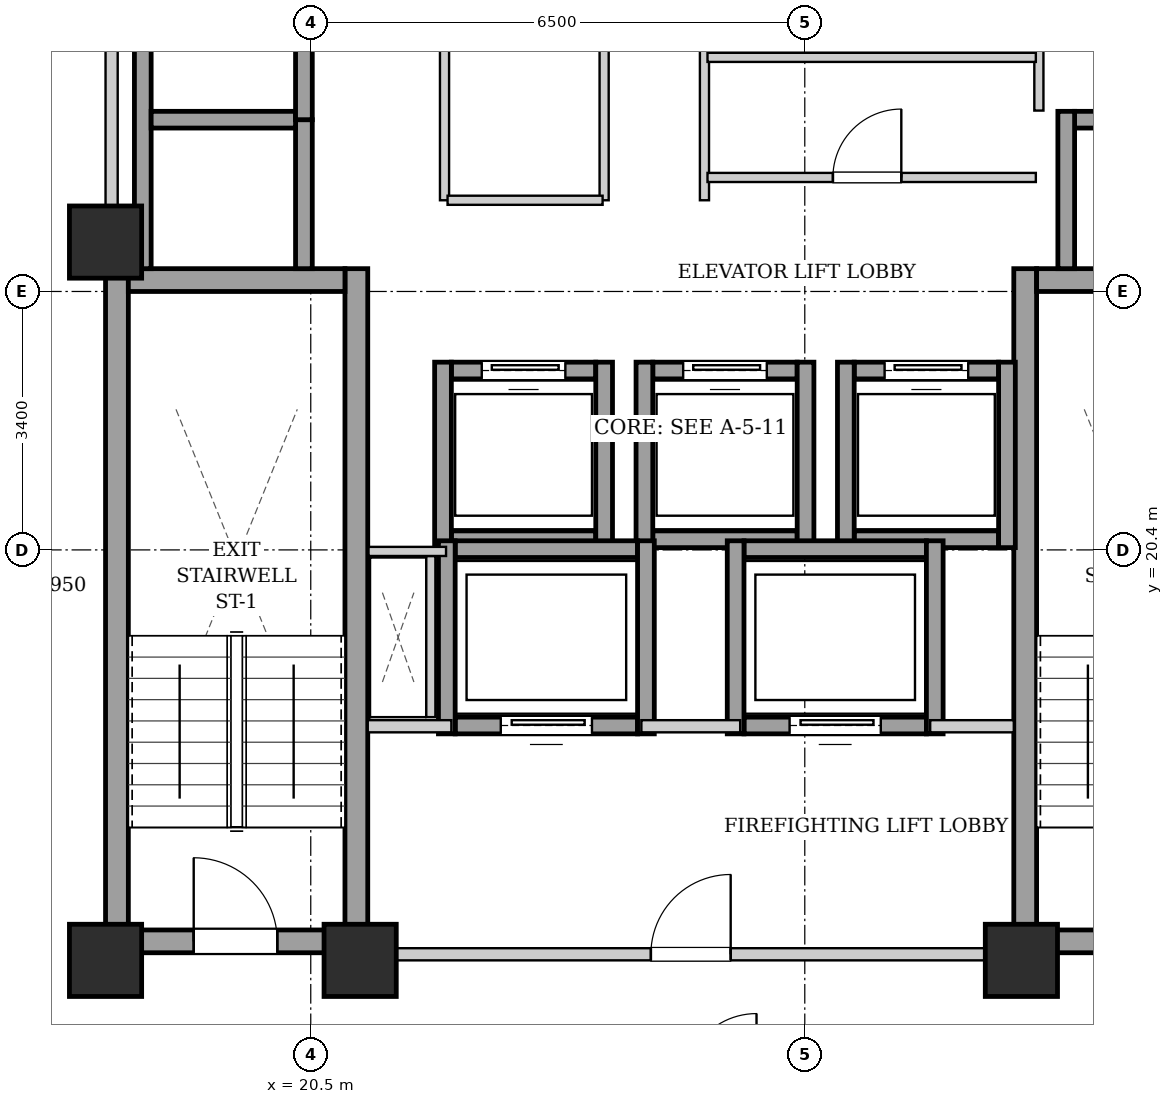
"""IFC4 building model, lengths in metres.
Left out: names, types, materials, properties, quantities, classifications, styles, units other than length and angle.
Written with IfcOpenShell. Run it as: python <this file> out.ifc"""

import sys

from ifc_helpers import new_model, si_unit, direction, frame, frame_2d, origin, origin_2d, place, context, subcontext, project, spatial, rectangle, extrude, element, fill, save


model = new_model("IFC4")
c1 = context("Model", 3, precision=1e-05, world=origin(), true_north=direction((0.0, 1.0)))
c2 = subcontext(c1, "Body", "Model", "MODEL_VIEW")
j1 = project(units=[si_unit("LENGTHUNIT", "METRE"), si_unit("PLANEANGLEUNIT", "RADIAN")], contexts=[c1])
p1 = place(None, origin())
s1 = spatial("IfcSite", under=j1, at=p1, CompositionType="ELEMENT")
p2 = place(p1, origin())
s2 = spatial("IfcBuilding", under=s1, at=p2, CompositionType="ELEMENT")
p3 = place(p2, frame((0.0, 0.0, 134.15)))
s3 = spatial("IfcBuildingStorey", under=s2, at=p3, CompositionType="ELEMENT", Elevation=134.15)
for number, where, z_axis, x_axis in (
    (1, (17.8, 15.0, 0.0), (0.0, 0.0, 1.0), (1.0, 0.0, 0.0)),
    (2, (21.15, 15.0, 0.0), (0.0, 0.0, 1.0), (1.0, 0.0, 0.0)),
    (3, (29.85, 15.0, 0.0), (0.0, 0.0, 1.0), (1.0, 0.0, 0.0)),
    (4, (17.8, 24.45, 0.0), (0.0, 0.0, 1.0), (1.0, 0.0, 0.0)),
):
    element("IfcColumn", number, at=place(p3, frame(where, z_axis=z_axis, x_axis=x_axis)), inside=s3, PredefinedType="COLUMN", context=c2, shape_type="SweptSolid", body=[
        extrude(rectangle(XDim=0.95, YDim=0.95, at=origin_2d()), origin(), (0.0, 0.0, 1.0), 3.25),
    ])
for number, where, z_axis, x_axis in (
    (5, (17.95, 15.1, 0.0), (0.0, 0.0, 1.0), (0.0, 1.0, 0.0)),
    (6, (21.1, 15.1, 0.0), (0.0, 0.0, 1.0), (0.0, 1.0, 0.0)),
):
    element("IfcWall", number, at=place(p3, frame(where, z_axis=z_axis, x_axis=x_axis)), inside=s3, PredefinedType="SHEAR", context=c2, shape_type="SweptSolid", body=[
        extrude(rectangle(XDim=9.0, YDim=0.3, at=frame_2d((4.5, 0.0))), origin(), (0.0, 0.0, 1.0), 2.99),
    ])
p4 = place(p3, frame((18.1, 23.95, 0.0), z_axis=(0.0, 0.0, 1.0), x_axis=(1.0, 0.0, 0.0)))
e7 = element("IfcWall", 7, at=p4, inside=s3, PredefinedType="SHEAR", context=c2, shape_type="SweptSolid", body=[
    extrude(rectangle(XDim=2.85, YDim=0.3, at=frame_2d((1.425, 0.0))), origin(), (0.0, 0.0, 1.0), 2.99),
])
p5 = place(p3, frame((18.1, 15.25, 0.0), z_axis=(0.0, 0.0, 1.0), x_axis=(1.0, 0.0, 0.0)))
e8 = element("IfcWall", 8, at=p5, inside=s3, PredefinedType="SHEAR", context=c2, shape_type="SweptSolid", body=[
    extrude(rectangle(XDim=2.85, YDim=0.3, at=frame_2d((1.425, 0.0))), origin(), (0.0, 0.0, 1.0), 2.99),
])
p6 = place(p5, frame((0.86, 0.0, 0.0)))
e9 = element("IfcOpeningElement", 9, at=p6, cuts=e8, PredefinedType="OPENING", context=c2, shape_type="SweptSolid", body=[
    extrude(rectangle(XDim=1.1, YDim=2.05, at=frame_2d((0.55, 1.025))), frame((0.0, 0.16, 0.0), z_axis=(0.0, -1.0, 0.0), x_axis=(1.0, 0.0, 0.0)), (0.0, 0.0, 1.0), 0.32),
])
p7 = place(p3, frame((29.9, 15.1, 0.0), z_axis=(0.0, 0.0, 1.0), x_axis=(0.0, 1.0, 0.0)))
e10 = element("IfcWall", 10, at=p7, inside=s3, PredefinedType="SHEAR", context=c2, shape_type="SweptSolid", body=[
    extrude(rectangle(XDim=9.0, YDim=0.3, at=frame_2d((4.5, 0.0))), origin(), (0.0, 0.0, 1.0), 2.99),
])
p8 = place(p3, frame((30.05, 23.95, 0.0), z_axis=(0.0, 0.0, 1.0), x_axis=(1.0, 0.0, 0.0)))
e11 = element("IfcWall", 11, at=p8, inside=s3, PredefinedType="SHEAR", context=c2, shape_type="SweptSolid", body=[
    extrude(rectangle(XDim=2.85, YDim=0.3, at=frame_2d((1.425, 0.0))), origin(), (0.0, 0.0, 1.0), 2.99),
])
p9 = place(p3, frame((30.05, 15.25, 0.0), z_axis=(0.0, 0.0, 1.0), x_axis=(1.0, 0.0, 0.0)))
e12 = element("IfcWall", 12, at=p9, inside=s3, PredefinedType="SHEAR", context=c2, shape_type="SweptSolid", body=[
    extrude(rectangle(XDim=2.85, YDim=0.3, at=frame_2d((1.425, 0.0))), origin(), (0.0, 0.0, 1.0), 2.99),
])
p10 = place(p9, frame((0.86, 0.0, 0.0)))
e13 = element("IfcOpeningElement", 13, at=p10, cuts=e12, PredefinedType="OPENING", context=c2, shape_type="SweptSolid", body=[
    extrude(rectangle(XDim=1.1, YDim=2.05, at=frame_2d((0.55, 1.025))), frame((0.0, 0.16, 0.0), z_axis=(0.0, -1.0, 0.0), x_axis=(1.0, 0.0, 0.0)), (0.0, 0.0, 1.0), 0.32),
])
p11 = place(p3, frame((22.35, 20.54, 0.0), z_axis=(0.0, 0.0, 1.0), x_axis=(1.0, 0.0, 0.0)))
e14 = element("IfcWall", 14, at=p11, inside=s3, PredefinedType="SHEAR", context=c2, shape_type="SweptSolid", body=[
    extrude(rectangle(XDim=1.9, YDim=0.22, at=frame_2d((0.95, 0.0))), origin(), (0.0, 0.0, 1.0), 2.99),
])
p12 = place(p3, frame((22.35, 22.76, 0.0), z_axis=(0.0, 0.0, 1.0), x_axis=(1.0, 0.0, 0.0)))
e15 = element("IfcWall", 15, at=p12, inside=s3, PredefinedType="SHEAR", context=c2, shape_type="SweptSolid", body=[
    extrude(rectangle(XDim=1.9, YDim=0.22, at=frame_2d((0.95, 0.0))), origin(), (0.0, 0.0, 1.0), 2.99),
])
p13 = place(p12, frame((0.4, 0.0, 0.0)))
e16 = element("IfcOpeningElement", 16, at=p13, cuts=e15, PredefinedType="OPENING", context=c2, shape_type="SweptSolid", body=[
    extrude(rectangle(XDim=1.1, YDim=2.15, at=frame_2d((0.55, 1.075))), frame((0.0, 0.12, 0.0), z_axis=(0.0, -1.0, 0.0), x_axis=(1.0, 0.0, 0.0)), (0.0, 0.0, 1.0), 0.24),
])
for number, where, z_axis, x_axis in (
    (17, (22.24, 20.43, 0.0), (0.0, 0.0, 1.0), (0.0, 1.0, 0.0)),
    (18, (24.36, 20.43, 0.0), (0.0, 0.0, 1.0), (0.0, 1.0, 0.0)),
):
    element("IfcWall", number, at=place(p3, frame(where, z_axis=z_axis, x_axis=x_axis)), inside=s3, PredefinedType="SHEAR", context=c2, shape_type="SweptSolid", body=[
        extrude(rectangle(XDim=2.44, YDim=0.22, at=frame_2d((1.22, 0.0))), origin(), (0.0, 0.0, 1.0), 2.99),
    ])
p14 = place(p3, frame((25.0, 20.54, 0.0), z_axis=(0.0, 0.0, 1.0), x_axis=(1.0, 0.0, 0.0)))
e19 = element("IfcWall", 19, at=p14, inside=s3, PredefinedType="SHEAR", context=c2, shape_type="SweptSolid", body=[
    extrude(rectangle(XDim=1.9, YDim=0.22, at=frame_2d((0.95, 0.0))), origin(), (0.0, 0.0, 1.0), 2.99),
])
p15 = place(p3, frame((25.0, 22.76, 0.0), z_axis=(0.0, 0.0, 1.0), x_axis=(1.0, 0.0, 0.0)))
e20 = element("IfcWall", 20, at=p15, inside=s3, PredefinedType="SHEAR", context=c2, shape_type="SweptSolid", body=[
    extrude(rectangle(XDim=1.9, YDim=0.22, at=frame_2d((0.95, 0.0))), origin(), (0.0, 0.0, 1.0), 2.99),
])
p16 = place(p15, frame((0.4, 0.0, 0.0)))
e21 = element("IfcOpeningElement", 21, at=p16, cuts=e20, PredefinedType="OPENING", context=c2, shape_type="SweptSolid", body=[
    extrude(rectangle(XDim=1.1, YDim=2.15, at=frame_2d((0.55, 1.075))), frame((0.0, 0.12, 0.0), z_axis=(0.0, -1.0, 0.0), x_axis=(1.0, 0.0, 0.0)), (0.0, 0.0, 1.0), 0.24),
])
for number, where, z_axis, x_axis in (
    (22, (24.89, 20.43, 0.0), (0.0, 0.0, 1.0), (0.0, 1.0, 0.0)),
    (23, (27.01, 20.43, 0.0), (0.0, 0.0, 1.0), (0.0, 1.0, 0.0)),
):
    element("IfcWall", number, at=place(p3, frame(where, z_axis=z_axis, x_axis=x_axis)), inside=s3, PredefinedType="SHEAR", context=c2, shape_type="SweptSolid", body=[
        extrude(rectangle(XDim=2.44, YDim=0.22, at=frame_2d((1.22, 0.0))), origin(), (0.0, 0.0, 1.0), 2.99),
    ])
p17 = place(p3, frame((27.65, 20.54, 0.0), z_axis=(0.0, 0.0, 1.0), x_axis=(1.0, 0.0, 0.0)))
e24 = element("IfcWall", 24, at=p17, inside=s3, PredefinedType="SHEAR", context=c2, shape_type="SweptSolid", body=[
    extrude(rectangle(XDim=1.9, YDim=0.22, at=frame_2d((0.95, 0.0))), origin(), (0.0, 0.0, 1.0), 2.99),
])
p18 = place(p3, frame((27.65, 22.76, 0.0), z_axis=(0.0, 0.0, 1.0), x_axis=(1.0, 0.0, 0.0)))
e25 = element("IfcWall", 25, at=p18, inside=s3, PredefinedType="SHEAR", context=c2, shape_type="SweptSolid", body=[
    extrude(rectangle(XDim=1.9, YDim=0.22, at=frame_2d((0.95, 0.0))), origin(), (0.0, 0.0, 1.0), 2.99),
])
p19 = place(p18, frame((0.4, 0.0, 0.0)))
e26 = element("IfcOpeningElement", 26, at=p19, cuts=e25, PredefinedType="OPENING", context=c2, shape_type="SweptSolid", body=[
    extrude(rectangle(XDim=1.1, YDim=2.15, at=frame_2d((0.55, 1.075))), frame((0.0, 0.12, 0.0), z_axis=(0.0, -1.0, 0.0), x_axis=(1.0, 0.0, 0.0)), (0.0, 0.0, 1.0), 0.24),
])
for number, where, z_axis, x_axis in (
    (27, (27.54, 20.43, 0.0), (0.0, 0.0, 1.0), (0.0, 1.0, 0.0)),
    (28, (29.66, 20.43, 0.0), (0.0, 0.0, 1.0), (0.0, 1.0, 0.0)),
):
    element("IfcWall", number, at=place(p3, frame(where, z_axis=z_axis, x_axis=x_axis)), inside=s3, PredefinedType="SHEAR", context=c2, shape_type="SweptSolid", body=[
        extrude(rectangle(XDim=2.44, YDim=0.22, at=frame_2d((1.22, 0.0))), origin(), (0.0, 0.0, 1.0), 2.99),
    ])
p20 = place(p3, frame((18.29, 24.1, 0.0), z_axis=(0.0, 0.0, 1.0), x_axis=(0.0, 1.0, 0.0)))
e29 = element("IfcWall", 29, at=p20, inside=s3, PredefinedType="SHEAR", context=c2, shape_type="SweptSolid", body=[
    extrude(rectangle(XDim=4.14, YDim=0.22, at=frame_2d((2.07, 0.0))), origin(), (0.0, 0.0, 1.0), 2.99),
])
p21 = place(p3, frame((20.41, 24.1, 0.0), z_axis=(0.0, 0.0, 1.0), x_axis=(0.0, 1.0, 0.0)))
e30 = element("IfcWall", 30, at=p21, inside=s3, PredefinedType="SHEAR", context=c2, shape_type="SweptSolid", body=[
    extrude(rectangle(XDim=1.96, YDim=0.22, at=frame_2d((0.98, 0.0))), origin(), (0.0, 0.0, 1.0), 2.99),
])
p22 = place(p3, frame((18.4, 26.06, 0.0), z_axis=(0.0, 0.0, 1.0), x_axis=(1.0, 0.0, 0.0)))
e31 = element("IfcWall", 31, at=p22, inside=s3, PredefinedType="SHEAR", context=c2, shape_type="SweptSolid", body=[
    extrude(rectangle(XDim=1.9, YDim=0.22, at=frame_2d((0.95, 0.0))), origin(), (0.0, 0.0, 1.0), 2.99),
])
p23 = place(p3, frame((20.41, 26.06, 0.0), z_axis=(0.0, 0.0, 1.0), x_axis=(0.0, 1.0, 0.0)))
e32 = element("IfcWall", 32, at=p23, inside=s3, PredefinedType="SHEAR", context=c2, shape_type="SweptSolid", body=[
    extrude(rectangle(XDim=2.18, YDim=0.22, at=frame_2d((1.09, 0.0))), origin(), (0.0, 0.0, 1.0), 2.99),
])
p24 = place(p3, frame((30.55, 26.06, 0.0), z_axis=(0.0, 0.0, 1.0), x_axis=(1.0, 0.0, 0.0)))
e33 = element("IfcWall", 33, at=p24, inside=s3, PredefinedType="SHEAR", context=c2, shape_type="SweptSolid", body=[
    extrude(rectangle(XDim=1.9, YDim=0.22, at=frame_2d((0.95, 0.0))), origin(), (0.0, 0.0, 1.0), 2.99),
])
p25 = place(p3, frame((30.44, 24.1, 0.0), z_axis=(0.0, 0.0, 1.0), x_axis=(0.0, 1.0, 0.0)))
e34 = element("IfcWall", 34, at=p25, inside=s3, PredefinedType="SHEAR", context=c2, shape_type="SweptSolid", body=[
    extrude(rectangle(XDim=2.07, YDim=0.22, at=frame_2d((1.035, 0.0))), origin(), (0.0, 0.0, 1.0), 2.99),
])
p26 = place(p3, frame((22.4, 18.09, 0.0), z_axis=(0.0, 0.0, 1.0), x_axis=(1.0, 0.0, 0.0)))
e35 = element("IfcWall", 35, at=p26, inside=s3, PredefinedType="SHEAR", context=c2, shape_type="SweptSolid", body=[
    extrude(rectangle(XDim=2.4, YDim=0.22, at=frame_2d((1.2, 0.0))), origin(), (0.0, 0.0, 1.0), 2.99),
])
p27 = place(p26, frame((0.6, 0.0, 0.0)))
e36 = element("IfcOpeningElement", 36, at=p27, cuts=e35, PredefinedType="OPENING", context=c2, shape_type="SweptSolid", body=[
    extrude(rectangle(XDim=1.2, YDim=2.15, at=frame_2d((0.6, 1.075))), frame((0.0, 0.12, 0.0), z_axis=(0.0, -1.0, 0.0), x_axis=(1.0, 0.0, 0.0)), (0.0, 0.0, 1.0), 0.24),
])
p28 = place(p3, frame((22.4, 20.41, 0.0), z_axis=(0.0, 0.0, 1.0), x_axis=(1.0, 0.0, 0.0)))
e37 = element("IfcWall", 37, at=p28, inside=s3, PredefinedType="SHEAR", context=c2, shape_type="SweptSolid", body=[
    extrude(rectangle(XDim=2.4, YDim=0.22, at=frame_2d((1.2, 0.0))), origin(), (0.0, 0.0, 1.0), 2.99),
])
for number, where, z_axis, x_axis in (
    (38, (22.29, 17.98, 0.0), (0.0, 0.0, 1.0), (0.0, 1.0, 0.0)),
    (39, (24.91, 17.98, 0.0), (0.0, 0.0, 1.0), (0.0, 1.0, 0.0)),
):
    element("IfcWall", number, at=place(p3, frame(where, z_axis=z_axis, x_axis=x_axis)), inside=s3, PredefinedType="SHEAR", context=c2, shape_type="SweptSolid", body=[
        extrude(rectangle(XDim=2.54, YDim=0.22, at=frame_2d((1.27, 0.0))), origin(), (0.0, 0.0, 1.0), 2.99),
    ])
p29 = place(p3, frame((26.2, 18.09, 0.0), z_axis=(0.0, 0.0, 1.0), x_axis=(1.0, 0.0, 0.0)))
e40 = element("IfcWall", 40, at=p29, inside=s3, PredefinedType="SHEAR", context=c2, shape_type="SweptSolid", body=[
    extrude(rectangle(XDim=2.4, YDim=0.22, at=frame_2d((1.2, 0.0))), origin(), (0.0, 0.0, 1.0), 2.99),
])
p30 = place(p29, frame((0.6, 0.0, 0.0)))
e41 = element("IfcOpeningElement", 41, at=p30, cuts=e40, PredefinedType="OPENING", context=c2, shape_type="SweptSolid", body=[
    extrude(rectangle(XDim=1.2, YDim=2.15, at=frame_2d((0.6, 1.075))), frame((0.0, 0.12, 0.0), z_axis=(0.0, -1.0, 0.0), x_axis=(1.0, 0.0, 0.0)), (0.0, 0.0, 1.0), 0.24),
])
p31 = place(p3, frame((26.2, 20.41, 0.0), z_axis=(0.0, 0.0, 1.0), x_axis=(1.0, 0.0, 0.0)))
e42 = element("IfcWall", 42, at=p31, inside=s3, PredefinedType="SHEAR", context=c2, shape_type="SweptSolid", body=[
    extrude(rectangle(XDim=2.4, YDim=0.22, at=frame_2d((1.2, 0.0))), origin(), (0.0, 0.0, 1.0), 2.99),
])
for number, where, z_axis, x_axis in (
    (43, (26.09, 17.98, 0.0), (0.0, 0.0, 1.0), (0.0, 1.0, 0.0)),
    (44, (28.71, 17.98, 0.0), (0.0, 0.0, 1.0), (0.0, 1.0, 0.0)),
):
    element("IfcWall", number, at=place(p3, frame(where, z_axis=z_axis, x_axis=x_axis)), inside=s3, PredefinedType="SHEAR", context=c2, shape_type="SweptSolid", body=[
        extrude(rectangle(XDim=2.54, YDim=0.22, at=frame_2d((1.27, 0.0))), origin(), (0.0, 0.0, 1.0), 2.99),
    ])
p32 = place(p3, frame((21.25, 15.08, 0.0), z_axis=(0.0, 0.0, 1.0), x_axis=(1.0, 0.0, 0.0)))
e45 = element("IfcWall", 45, at=p32, inside=s3, PredefinedType="PARTITIONING", context=c2, shape_type="SweptSolid", body=[
    extrude(rectangle(XDim=8.5, YDim=0.16, at=frame_2d((4.25, 0.0))), origin(), (0.0, 0.0, 1.0), 2.426),
])
p33 = place(p32, frame((3.725, 0.0, 0.0)))
e46 = element("IfcOpeningElement", 46, at=p33, cuts=e45, PredefinedType="OPENING", context=c2, shape_type="SweptSolid", body=[
    extrude(rectangle(XDim=1.05, YDim=2.05, at=frame_2d((0.525, 1.025))), frame((0.0, 0.09, 0.0), z_axis=(0.0, -1.0, 0.0), x_axis=(1.0, 0.0, 0.0)), (0.0, 0.0, 1.0), 0.18),
])
p34 = place(p3, frame((21.25, 18.08, 0.0), z_axis=(0.0, 0.0, 1.0), x_axis=(1.0, 0.0, 0.0)))
e47 = element("IfcWall", 47, at=p34, inside=s3, PredefinedType="PARTITIONING", context=c2, shape_type="SweptSolid", body=[
    extrude(rectangle(XDim=1.1, YDim=0.16, at=frame_2d((0.55, 0.0))), origin(), (0.0, 0.0, 1.0), 2.99),
])
p35 = place(p3, frame((24.85, 18.08, 0.0), z_axis=(0.0, 0.0, 1.0), x_axis=(1.0, 0.0, 0.0)))
e48 = element("IfcWall", 48, at=p35, inside=s3, PredefinedType="PARTITIONING", context=c2, shape_type="SweptSolid", body=[
    extrude(rectangle(XDim=1.3, YDim=0.16, at=frame_2d((0.65, 0.0))), origin(), (0.0, 0.0, 1.0), 2.99),
])
p36 = place(p3, frame((28.65, 18.08, 0.0), z_axis=(0.0, 0.0, 1.0), x_axis=(1.0, 0.0, 0.0)))
e49 = element("IfcWall", 49, at=p36, inside=s3, PredefinedType="PARTITIONING", context=c2, shape_type="SweptSolid", body=[
    extrude(rectangle(XDim=1.1, YDim=0.16, at=frame_2d((0.55, 0.0))), origin(), (0.0, 0.0, 1.0), 2.99),
])
p37 = place(p3, frame((17.88, 24.12, 0.0), z_axis=(0.0, 0.0, 1.0), x_axis=(0.0, 1.0, 0.0)))
e50 = element("IfcWall", 50, at=p37, inside=s3, PredefinedType="PARTITIONING", context=c2, shape_type="SweptSolid", body=[
    extrude(rectangle(XDim=4.76, YDim=0.16, at=frame_2d((2.38, 0.0))), origin(), (0.0, 0.0, 1.0), 2.99),
])
p38 = place(p3, frame((22.08, 18.2, 0.0), z_axis=(0.0, 0.0, 1.0), x_axis=(0.0, 1.0, 0.0)))
e51 = element("IfcWall", 51, at=p38, inside=s3, PredefinedType="PARTITIONING", context=c2, shape_type="SweptSolid", body=[
    extrude(rectangle(XDim=2.12, YDim=0.12, at=frame_2d((1.06, 0.0))), origin(), (0.0, 0.0, 1.0), 2.99),
])
p39 = place(p3, frame((22.28, 20.38, 0.0), z_axis=(0.0, 0.0, 1.0), x_axis=(-1.0, 0.0, 0.0)))
e52 = element("IfcWall", 52, at=p39, inside=s3, PredefinedType="PARTITIONING", context=c2, shape_type="SweptSolid", body=[
    extrude(rectangle(XDim=1.02, YDim=0.12, at=frame_2d((0.51, 0.0))), origin(), (0.0, 0.0, 1.0), 2.99),
])
for number, where, z_axis, x_axis in (
    (53, (24.36, 25.0, 0.0), (0.0, 0.0, 1.0), (0.0, 1.0, 0.0)),
    (54, (25.68, 25.0, 0.0), (0.0, 0.0, 1.0), (0.0, 1.0, 0.0)),
):
    element("IfcWall", number, at=place(p3, frame(where, z_axis=z_axis, x_axis=x_axis)), inside=s3, PredefinedType="PARTITIONING", context=c2, shape_type="SweptSolid", body=[
        extrude(rectangle(XDim=3.87, YDim=0.12, at=frame_2d((1.935, 0.0))), origin(), (0.0, 0.0, 1.0), 2.99),
    ])
p40 = place(p3, frame((30.08, 26.18, 0.0), z_axis=(0.0, 0.0, 1.0), x_axis=(0.0, 1.0, 0.0)))
e55 = element("IfcWall", 55, at=p40, inside=s3, PredefinedType="PARTITIONING", context=c2, shape_type="SweptSolid", body=[
    extrude(rectangle(XDim=2.68, YDim=0.12, at=frame_2d((1.34, 0.0))), origin(), (0.0, 0.0, 1.0), 2.99),
])
p41 = place(p3, frame((22.26, 25.0, 0.0), z_axis=(0.0, 0.0, 1.0), x_axis=(0.0, 1.0, 0.0)))
e56 = element("IfcWall", 56, at=p41, inside=s3, PredefinedType="PARTITIONING", context=c2, shape_type="SweptSolid", body=[
    extrude(rectangle(XDim=3.86, YDim=0.12, at=frame_2d((1.93, 0.0))), origin(), (0.0, 0.0, 1.0), 2.99),
])
p42 = place(p3, frame((22.3, 25.0, 0.0), z_axis=(0.0, 0.0, 1.0), x_axis=(1.0, 0.0, 0.0)))
e57 = element("IfcWall", 57, at=p42, inside=s3, PredefinedType="PARTITIONING", context=c2, shape_type="SweptSolid", body=[
    extrude(rectangle(XDim=2.04, YDim=0.12, at=frame_2d((1.02, 0.0))), origin(), (0.0, 0.0, 1.0), 2.99),
])
p43 = place(p3, frame((25.72, 26.88, 0.0), z_axis=(0.0, 0.0, 1.0), x_axis=(1.0, 0.0, 0.0)))
e58 = element("IfcWall", 58, at=p43, inside=s3, PredefinedType="PARTITIONING", context=c2, shape_type="SweptSolid", body=[
    extrude(rectangle(XDim=4.32, YDim=0.12, at=frame_2d((2.16, 0.0))), origin(), (0.0, 0.0, 1.0), 2.99),
])
p44 = place(p3, frame((25.72, 25.3, 0.0), z_axis=(0.0, 0.0, 1.0), x_axis=(1.0, 0.0, 0.0)))
e59 = element("IfcWall", 59, at=p44, inside=s3, PredefinedType="PARTITIONING", context=c2, shape_type="SweptSolid", body=[
    extrude(rectangle(XDim=4.32, YDim=0.12, at=frame_2d((2.16, 0.0))), origin(), (0.0, 0.0, 1.0), 2.99),
])
p45 = place(p44, frame((1.65, 0.0, 0.0)))
e60 = element("IfcOpeningElement", 60, at=p45, cuts=e59, PredefinedType="OPENING", context=c2, shape_type="SweptSolid", body=[
    extrude(rectangle(XDim=0.9, YDim=2.05, at=frame_2d((0.45, 1.025))), frame((0.0, 0.07, 0.0), z_axis=(0.0, -1.0, 0.0), x_axis=(1.0, 0.0, 0.0)), (0.0, 0.0, 1.0), 0.14),
])
p46 = place(p6, origin())
e61 = element("IfcDoor", 61, at=p46, inside=s3, OperationType="SINGLE_SWING_LEFT", PredefinedType="DOOR", context=c2, shape_type="SweptSolid", body=[
    extrude(rectangle(XDim=1.1, YDim=2.05, at=frame_2d((0.55, 1.025))), frame((0.0, 0.025, 0.0), z_axis=(0.0, -1.0, 0.0), x_axis=(1.0, 0.0, 0.0)), (0.0, 0.0, 1.0), 0.05),
])
fill(e9, e61)
p47 = place(p13, origin())
e62 = element("IfcDoor", 62, at=p47, inside=s3, OperationType="SLIDING_TO_LEFT", PredefinedType="DOOR", context=c2, shape_type="SweptSolid", body=[
    extrude(rectangle(XDim=1.1, YDim=2.15, at=frame_2d((0.55, 1.075))), frame((0.0, 0.025, 0.0), z_axis=(0.0, -1.0, 0.0), x_axis=(1.0, 0.0, 0.0)), (0.0, 0.0, 1.0), 0.05),
])
fill(e16, e62)
p48 = place(p16, origin())
e63 = element("IfcDoor", 63, at=p48, inside=s3, OperationType="SLIDING_TO_LEFT", PredefinedType="DOOR", context=c2, shape_type="SweptSolid", body=[
    extrude(rectangle(XDim=1.1, YDim=2.15, at=frame_2d((0.55, 1.075))), frame((0.0, 0.025, 0.0), z_axis=(0.0, -1.0, 0.0), x_axis=(1.0, 0.0, 0.0)), (0.0, 0.0, 1.0), 0.05),
])
fill(e21, e63)
p49 = place(p19, origin())
e64 = element("IfcDoor", 64, at=p49, inside=s3, OperationType="SLIDING_TO_LEFT", PredefinedType="DOOR", context=c2, shape_type="SweptSolid", body=[
    extrude(rectangle(XDim=1.1, YDim=2.15, at=frame_2d((0.55, 1.075))), frame((0.0, 0.025, 0.0), z_axis=(0.0, -1.0, 0.0), x_axis=(1.0, 0.0, 0.0)), (0.0, 0.0, 1.0), 0.05),
])
fill(e26, e64)
p50 = place(p27, origin())
e65 = element("IfcDoor", 65, at=p50, inside=s3, OperationType="SLIDING_TO_LEFT", PredefinedType="DOOR", context=c2, shape_type="SweptSolid", body=[
    extrude(rectangle(XDim=1.2, YDim=2.15, at=frame_2d((0.6, 1.075))), frame((0.0, 0.025, 0.0), z_axis=(0.0, -1.0, 0.0), x_axis=(1.0, 0.0, 0.0)), (0.0, 0.0, 1.0), 0.05),
])
fill(e36, e65)
p51 = place(p30, origin())
e66 = element("IfcDoor", 66, at=p51, inside=s3, OperationType="SLIDING_TO_LEFT", PredefinedType="DOOR", context=c2, shape_type="SweptSolid", body=[
    extrude(rectangle(XDim=1.2, YDim=2.15, at=frame_2d((0.6, 1.075))), frame((0.0, 0.025, 0.0), z_axis=(0.0, -1.0, 0.0), x_axis=(1.0, 0.0, 0.0)), (0.0, 0.0, 1.0), 0.05),
])
fill(e41, e66)
p52 = place(p33, origin())
e67 = element("IfcDoor", 67, at=p52, inside=s3, OperationType="SINGLE_SWING_RIGHT", PredefinedType="DOOR", context=c2, shape_type="SweptSolid", body=[
    extrude(rectangle(XDim=1.05, YDim=2.05, at=frame_2d((0.525, 1.025))), frame((0.0, 0.025, 0.0), z_axis=(0.0, -1.0, 0.0), x_axis=(1.0, 0.0, 0.0)), (0.0, 0.0, 1.0), 0.05),
])
fill(e46, e67)
p53 = place(p45, origin())
e68 = element("IfcDoor", 68, at=p53, inside=s3, OperationType="SINGLE_SWING_RIGHT", PredefinedType="DOOR", context=c2, shape_type="SweptSolid", body=[
    extrude(rectangle(XDim=0.9, YDim=2.05, at=frame_2d((0.45, 1.025))), frame((0.0, 0.025, 0.0), z_axis=(0.0, -1.0, 0.0), x_axis=(1.0, 0.0, 0.0)), (0.0, 0.0, 1.0), 0.05),
])
fill(e60, e68)
save(model, sys.argv[1])
